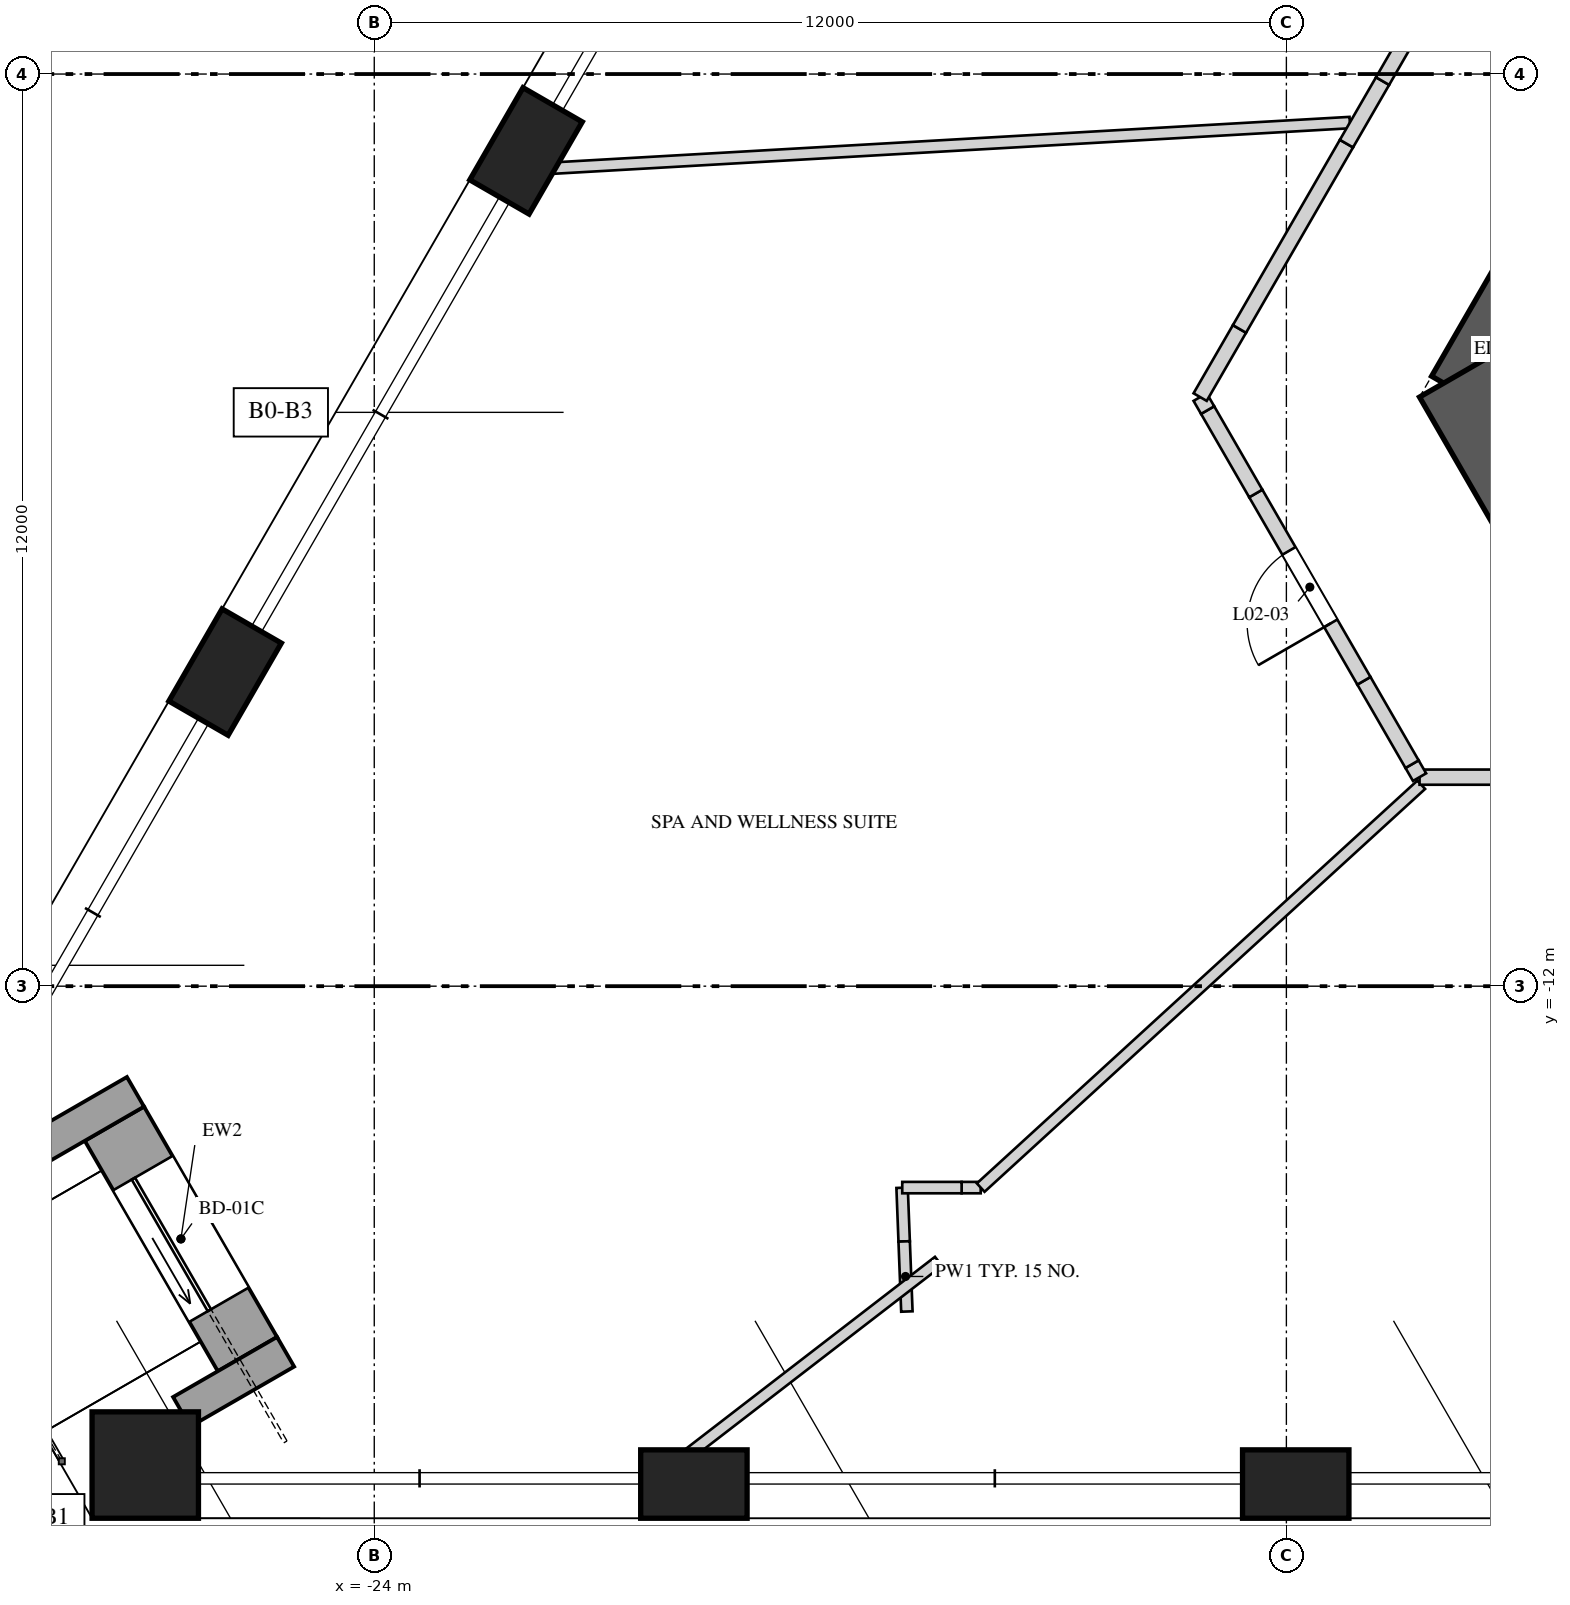
"""IFC4 building model, lengths in metres.
Left out: names, types, materials, properties, quantities, classifications, styles, units other than length and angle.
Written with IfcOpenShell. Run it as: python <this file> out.ifc"""

import sys

from ifc_helpers import new_model, si_unit, direction, frame, frame_2d, origin, origin_2d, place, context, subcontext, project, spatial, polyline, rectangle, outline, extrude, element, fill, save


model = new_model("IFC4")
c1 = context("Model", 3, precision=1e-05, world=origin(), true_north=direction((0.0, 1.0)))
c2 = subcontext(c1, "Body", "Model", "MODEL_VIEW")
j1 = project(units=[si_unit("LENGTHUNIT", "METRE"), si_unit("PLANEANGLEUNIT", "RADIAN")], contexts=[c1])
p1 = place(None, origin())
s1 = spatial("IfcSite", under=j1, at=p1, CompositionType="ELEMENT")
p2 = place(p1, origin())
s2 = spatial("IfcBuilding", under=s1, at=p2, CompositionType="ELEMENT")
p3 = place(p2, frame((0.0, 0.0, 15.0)))
s3 = spatial("IfcBuildingStorey", under=s2, at=p3, CompositionType="ELEMENT", Elevation=15.0)
p4 = place(p3, frame((-1.126, 10.45, 0.0), z_axis=(0.0, 0.0, 1.0), x_axis=(-0.500001757713, -0.866024388966, 0.0)))
e1 = element("IfcWall", 1, at=p4, inside=s3, PredefinedType="SHEAR", context=c2, shape_type="SweptSolid", body=[
    extrude(rectangle(XDim=16.974, YDim=1.1, at=frame_2d((8.487, 0.0))), origin(), (0.0, 0.0, 1.0), 5.0),
])
p5 = place(p4, frame((6.692, 0.0, 0.0)))
e2 = element("IfcOpeningElement", 2, at=p5, cuts=e1, PredefinedType="OPENING", context=c2, shape_type="SweptSolid", body=[
    extrude(rectangle(XDim=1.0, YDim=2.4, at=frame_2d((0.5, 1.2))), frame((0.0, 0.56, 0.0), z_axis=(0.0, -1.0, 0.0), x_axis=(1.0, 0.0, 0.0)), (0.0, 0.0, 1.0), 1.12),
])
p6 = place(p4, frame((14.397, 0.0, 0.0)))
e3 = element("IfcOpeningElement", 3, at=p6, cuts=e1, PredefinedType="OPENING", context=c2, shape_type="SweptSolid", body=[
    extrude(rectangle(XDim=0.8, YDim=2.1, at=frame_2d((0.4, 1.05))), frame((0.0, 0.56, 0.0), z_axis=(0.0, -1.0, 0.0), x_axis=(1.0, 0.0, 0.0)), (0.0, 0.0, 1.0), 1.12),
])
p7 = place(p3, frame((-9.772, -3.975, 0.0), z_axis=(0.0, 0.0, 1.0), x_axis=(0.499995765644, -0.866027848477, 0.0)))
e4 = element("IfcWall", 4, at=p7, inside=s3, PredefinedType="SHEAR", context=c2, shape_type="SweptSolid", body=[
    extrude(rectangle(XDim=2.887, YDim=1.1, at=frame_2d((1.443, 0.0))), origin(), (0.0, 0.0, 1.0), 5.0),
])
for number, where, z_axis, x_axis in (
    (5, (-22.003, -1.011, 0.0), (0.0, 0.0, 1.0), (-0.5, -0.866, 0.0)),
    (6, (-25.962, -7.868, 0.0), (0.0, 0.0, 1.0), (-0.5, -0.866, 0.0)),
):
    element("IfcColumn", number, at=place(p3, frame(where, z_axis=z_axis, x_axis=x_axis)), inside=s3, PredefinedType="COLUMN", context=c2, shape_type="SweptSolid", body=[
        extrude(rectangle(XDim=1.4, YDim=0.9, at=origin_2d()), origin(), (0.0, 0.0, 1.0), 5.0),
    ])
p8 = place(p3, frame((-27.013, -18.3, 0.0), z_axis=(0.0, 0.0, 1.0), x_axis=(1.0, 0.0, 0.0)))
e7 = element("IfcColumn", 7, at=p8, inside=s3, PredefinedType="COLUMN", context=c2, shape_type="SweptSolid", body=[
    extrude(rectangle(XDim=1.4, YDim=1.4, at=origin_2d()), origin(), (0.0, 0.0, 1.0), 5.0),
])
for number, where, z_axis, x_axis in (
    (8, (-19.795, -18.55, 0.0), (0.0, 0.0, 1.0), (1.0, 0.0, 0.0)),
    (9, (-11.877, -18.55, 0.0), (0.0, 0.0, 1.0), (1.0, 0.0, 0.0)),
):
    element("IfcColumn", number, at=place(p3, frame(where, z_axis=z_axis, x_axis=x_axis)), inside=s3, PredefinedType="COLUMN", context=c2, shape_type="SweptSolid", body=[
        extrude(rectangle(XDim=1.4, YDim=0.9, at=origin_2d()), origin(), (0.0, 0.0, 1.0), 5.0),
    ])
p9 = place(p3, frame((-25.669, -16.841, 0.0), z_axis=(0.0, 0.0, 1.0), x_axis=(-0.500010275428, 0.866019471182, 0.0)))
e10 = element("IfcWall", 10, at=p9, inside=s3, PredefinedType="SOLIDWALL", context=c2, shape_type="SweptSolid", body=[
    extrude(rectangle(XDim=3.5, YDim=0.9, at=frame_2d((1.75, 0.0))), origin(), (0.0, 0.0, 1.0), 4.3),
])
p10 = place(p9, frame((0.75, 0.0, 0.0)))
e11 = element("IfcOpeningElement", 11, at=p10, cuts=e10, PredefinedType="OPENING", context=c2, shape_type="SweptSolid", body=[
    extrude(rectangle(XDim=2.0, YDim=2.4, at=frame_2d((1.0, 1.2))), frame((0.0, 0.46, 0.0), z_axis=(0.0, -1.0, 0.0), x_axis=(1.0, 0.0, 0.0)), (0.0, 0.0, 1.0), 0.92),
])
p11 = place(p3, frame((-26.534, -17.6, 0.0), z_axis=(0.0, 0.0, 1.0), x_axis=(0.86597962928, 0.500079275387, 0.0)))
e12 = element("IfcWall", 12, at=p11, inside=s3, PredefinedType="SOLIDWALL", context=c2, shape_type="SweptSolid", body=[
    extrude(rectangle(XDim=1.579, YDim=0.45, at=frame_2d((0.79, 0.0))), origin(), (0.0, 0.0, 1.0), 2.55),
])
p12 = place(p3, frame((-28.509, -14.179, 0.0), z_axis=(0.0, 0.0, 1.0), x_axis=(0.866046570609, 0.499963336192, 0.0)))
e13 = element("IfcWall", 13, at=p12, inside=s3, PredefinedType="SOLIDWALL", context=c2, shape_type="SweptSolid", body=[
    extrude(rectangle(XDim=1.579, YDim=0.45, at=frame_2d((0.79, 0.0))), origin(), (0.0, 0.0, 1.0), 2.55),
])
p13 = place(p3, frame((-17.056, -14.652, 0.0), z_axis=(0.0, 0.0, 1.0), x_axis=(0.038353502747, -0.999264233738, 0.0)))
e14 = element("IfcWall", 14, at=p13, inside=s3, PredefinedType="PARTITIONING", context=c2, shape_type="SweptSolid", body=[
    extrude(rectangle(XDim=0.707, YDim=0.15, at=frame_2d((0.353, 0.0))), origin(), (0.0, 0.0, 1.0), 4.65),
])
p14 = place(p3, frame((-17.029, -15.358, 0.0), z_axis=(0.0, 0.0, 1.0), x_axis=(0.038890334198, -0.999243484795, 0.0)))
e15 = element("IfcWall", 15, at=p14, inside=s3, PredefinedType="PARTITIONING", context=c2, shape_type="SweptSolid", body=[
    extrude(rectangle(XDim=0.923, YDim=0.15, at=frame_2d((0.461, 0.0))), origin(), (0.0, 0.0, 1.0), 3.55),
])
p15 = place(p3, frame((-16.577, -15.62, 0.0), z_axis=(0.0, 0.0, 1.0), x_axis=(-0.79203798149, -0.610471814155, 0.0)))
e16 = element("IfcWall", 16, at=p15, inside=s3, PredefinedType="PARTITIONING", context=c2, shape_type="SweptSolid", body=[
    extrude(rectangle(XDim=4.603, YDim=0.15, at=frame_2d((2.301, 0.0))), origin(), (0.0, 0.0, 1.0), 3.55),
])
p16 = place(p3, frame((-16.022, -14.65, 0.0), z_axis=(0.0, 0.0, 1.0), x_axis=(-1.0, 0.0, 0.0)))
e17 = element("IfcWall", 17, at=p16, inside=s3, PredefinedType="PARTITIONING", context=c2, shape_type="SweptSolid", body=[
    extrude(rectangle(XDim=0.251, YDim=0.15, at=frame_2d((0.125, 0.0))), origin(), (0.0, 0.0, 1.0), 3.55),
])
p17 = place(p3, frame((-16.273, -14.65, 0.0), z_axis=(0.0, 0.0, 1.0), x_axis=(-1.0, 0.0, 0.0)))
e18 = element("IfcWall", 18, at=p17, inside=s3, PredefinedType="PARTITIONING", context=c2, shape_type="SweptSolid", body=[
    extrude(rectangle(XDim=0.781, YDim=0.15, at=frame_2d((0.391, 0.0))), origin(), (0.0, 0.0, 1.0), 4.65),
])
p18 = place(p3, frame((-11.165, -0.638, 0.0), z_axis=(0.0, 0.0, 1.0), x_axis=(-0.998369760977, -0.057077319203, 0.0)))
e19 = element("IfcWall", 19, at=p18, inside=s3, PredefinedType="PARTITIONING", context=c2, shape_type="SweptSolid", body=[
    extrude(rectangle(XDim=10.86, YDim=0.15, at=frame_2d((5.43, 0.0))), origin(), (0.0, 0.0, 1.0), 3.75),
])
p19 = place(p3, frame((-10.226, -9.35, 0.0), z_axis=(0.0, 0.0, 1.0), x_axis=(-0.738000060557, -0.674800645093, 0.0)))
e20 = element("IfcWall", 20, at=p19, inside=s3, PredefinedType="PARTITIONING", context=c2, shape_type="SweptSolid", body=[
    extrude(rectangle(XDim=7.854, YDim=0.15, at=frame_2d((3.927, 0.0))), origin(), (0.0, 0.0, 1.0), 3.55),
])
p20 = place(p3, frame((-9.213, -9.25, 0.0), z_axis=(0.0, 0.0, 1.0), x_axis=(-1.0, 0.0, 0.0)))
e21 = element("IfcWall", 21, at=p20, inside=s3, PredefinedType="SOLIDWALL", context=c2, shape_type="SweptSolid", body=[
    extrude(rectangle(XDim=1.035, YDim=0.2, at=frame_2d((0.518, 0.0))), origin(), (0.0, 0.0, 1.0), 3.55),
])
p21 = place(p3, frame((-10.248, -9.25, 0.0), z_axis=(0.0, 0.0, 1.0), x_axis=(-0.499865263774, 0.866103179807, 0.0)))
e22 = element("IfcWall", 22, at=p21, inside=s3, PredefinedType="SOLIDWALL", context=c2, shape_type="SweptSolid", body=[
    extrude(rectangle(XDim=0.197, YDim=0.2, at=frame_2d((0.099, 0.0))), origin(), (0.0, 0.0, 1.0), 3.55),
])
p22 = place(p3, frame((-10.347, -9.079, 0.0), z_axis=(0.0, 0.0, 1.0), x_axis=(-0.499911523785, 0.866076479525, 0.0)))
e23 = element("IfcWall", 23, at=p22, inside=s3, PredefinedType="SOLIDWALL", context=c2, shape_type="SweptSolid", body=[
    extrude(rectangle(XDim=1.267, YDim=0.2, at=frame_2d((0.633, 0.0))), origin(), (0.0, 0.0, 1.0), 4.65),
])
p23 = place(p3, frame((-10.98, -7.982, 0.0), z_axis=(0.0, 0.0, 1.0), x_axis=(-0.500024525844, 0.866011243319, 0.0)))
e24 = element("IfcWall", 24, at=p23, inside=s3, PredefinedType="SOLIDWALL", context=c2, shape_type="SweptSolid", body=[
    extrude(outline(polyline([(0.0, 0.0), (2.845, 0.0), (2.845, 3.55), (1.943, 3.55), (1.943, 4.65), (0.902, 4.65), (0.902, 3.55), (0.0, 3.55), (0.0, 0.0)])), frame((0.0, 0.1, 0.0), z_axis=(0.0, -1.0, 0.0), x_axis=(1.0, 0.0, 0.0)), (0.0, 0.0, 1.0), 0.2),
])
p24 = place(p23, frame((0.873, 0.0, 0.0)))
e25 = element("IfcOpeningElement", 25, at=p24, cuts=e24, PredefinedType="OPENING", context=c2, shape_type="SweptSolid", body=[
    extrude(rectangle(XDim=1.1, YDim=2.4, at=frame_2d((0.55, 1.2))), frame((0.0, 0.11, 0.0), z_axis=(0.0, -1.0, 0.0), x_axis=(1.0, 0.0, 0.0)), (0.0, 0.0, 1.0), 0.22),
])
p25 = place(p3, frame((-12.403, -5.518, 0.0), z_axis=(0.0, 0.0, 1.0), x_axis=(-0.500056058743, 0.865993035835, 0.0)))
e26 = element("IfcWall", 26, at=p25, inside=s3, PredefinedType="SOLIDWALL", context=c2, shape_type="SweptSolid", body=[
    extrude(rectangle(XDim=1.267, YDim=0.2, at=frame_2d((0.633, 0.0))), origin(), (0.0, 0.0, 1.0), 4.65),
])
p26 = place(p3, frame((-13.036, -4.421, 0.0), z_axis=(0.0, 0.0, 1.0), x_axis=(-0.499865263774, 0.866103179807, 0.0)))
e27 = element("IfcWall", 27, at=p26, inside=s3, PredefinedType="SOLIDWALL", context=c2, shape_type="SweptSolid", body=[
    extrude(rectangle(XDim=0.197, YDim=0.2, at=frame_2d((0.099, 0.0))), origin(), (0.0, 0.0, 1.0), 3.55),
])
p27 = place(p3, frame((-13.135, -4.25, 0.0), z_axis=(0.0, 0.0, 1.0), x_axis=(0.500171514983, 0.865926356915, 0.0)))
e28 = element("IfcWall", 28, at=p27, inside=s3, PredefinedType="SOLIDWALL", context=c2, shape_type="SweptSolid", body=[
    extrude(rectangle(XDim=1.035, YDim=0.2, at=frame_2d((0.518, 0.0))), origin(), (0.0, 0.0, 1.0), 3.55),
])
p28 = place(p3, frame((-12.617, -3.354, 0.0), z_axis=(0.0, 0.0, 1.0), x_axis=(0.49993514545, 0.866062844338, 0.0)))
e29 = element("IfcWall", 29, at=p28, inside=s3, PredefinedType="SOLIDWALL", context=c2, shape_type="SweptSolid", body=[
    extrude(rectangle(XDim=2.815, YDim=0.2, at=frame_2d((1.408, 0.0))), origin(), (0.0, 0.0, 1.0), 4.65),
])
p29 = place(p3, frame((-11.209, -0.915, 0.0), z_axis=(0.0, 0.0, 1.0), x_axis=(0.500174821557, 0.865924446982, 0.0)))
e30 = element("IfcWall", 30, at=p29, inside=s3, PredefinedType="SOLIDWALL", context=c2, shape_type="SweptSolid", body=[
    extrude(rectangle(XDim=0.95, YDim=0.2, at=frame_2d((0.475, 0.0))), origin(), (0.0, 0.0, 1.0), 3.75),
])
p30 = place(p3, frame((-10.734, -0.093, 0.0), z_axis=(0.0, 0.0, 1.0), x_axis=(0.499952348839, 0.866052913447, 0.0)))
e31 = element("IfcWall", 31, at=p30, inside=s3, PredefinedType="SOLIDWALL", context=c2, shape_type="SweptSolid", body=[
    extrude(rectangle(XDim=3.064, YDim=0.2, at=frame_2d((1.532, 0.0))), origin(), (0.0, 0.0, 1.0), 4.65),
])
p31 = place(p10, origin())
e32 = element("IfcDoor", 32, at=p31, inside=s3, OperationType="SLIDING_TO_LEFT", PredefinedType="DOOR", context=c2, shape_type="SweptSolid", body=[
    extrude(rectangle(XDim=2.0, YDim=2.4, at=frame_2d((1.0, 1.2))), frame((0.0, 0.025, 0.0), z_axis=(0.0, -1.0, 0.0), x_axis=(1.0, 0.0, 0.0)), (0.0, 0.0, 1.0), 0.05),
])
fill(e11, e32)
p32 = place(p24, origin())
e33 = element("IfcDoor", 33, at=p32, inside=s3, OperationType="SINGLE_SWING_LEFT", PredefinedType="DOOR", context=c2, shape_type="SweptSolid", body=[
    extrude(rectangle(XDim=1.1, YDim=2.4, at=frame_2d((0.55, 1.2))), frame((0.0, 0.025, 0.0), z_axis=(0.0, -1.0, 0.0), x_axis=(1.0, 0.0, 0.0)), (0.0, 0.0, 1.0), 0.05),
])
fill(e25, e33)
save(model, sys.argv[1])
